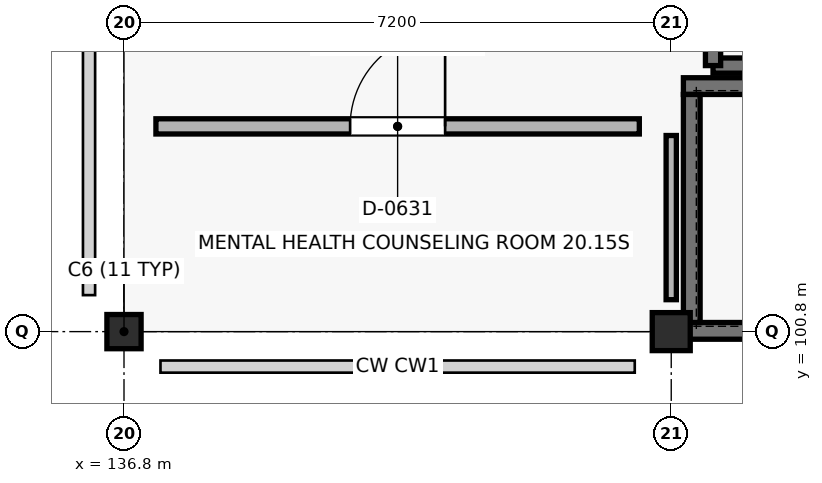
"""IFC4 building model, lengths in metres.
Left out: names, types, materials, properties, quantities, classifications, styles, units other than length and angle.
Written with IfcOpenShell. Run it as: python <this file> out.ifc"""

import sys

from ifc_helpers import new_model, si_unit, direction, frame, frame_2d, origin, origin_2d, place, context, subcontext, project, spatial, rectangle, extrude, element, fill, save


model = new_model("IFC4")
c1 = context("Model", 3, precision=1e-05, world=origin(), true_north=direction((0.0, 1.0)))
c2 = subcontext(c1, "Body", "Model", "MODEL_VIEW")
j1 = project(units=[si_unit("LENGTHUNIT", "METRE"), si_unit("PLANEANGLEUNIT", "RADIAN")], contexts=[c1])
p1 = place(None, origin())
s1 = spatial("IfcSite", under=j1, at=p1, CompositionType="ELEMENT")
p2 = place(p1, origin())
s2 = spatial("IfcBuilding", under=s1, at=p2, CompositionType="ELEMENT")
p3 = place(p2, frame((0.0, 0.0, 17.55)))
s3 = spatial("IfcBuildingStorey", under=s2, at=p3, CompositionType="ELEMENT", Elevation=17.55)
p4 = place(p3, frame((136.8, 100.8, 0.0), z_axis=(0.0, 0.0, 1.0), x_axis=(1.0, 0.0, 0.0)))
e1 = element("IfcColumn", 1, at=p4, inside=s3, PredefinedType="COLUMN", context=c2, shape_type="SweptSolid", body=[
    extrude(rectangle(XDim=0.45, YDim=0.45, at=origin_2d()), origin(), (0.0, 0.0, 1.0), 3.83),
])
p5 = place(p3, frame((144.0, 100.8, 0.0), z_axis=(0.0, 0.0, 1.0), x_axis=(1.0, 0.0, 0.0)))
e2 = element("IfcColumn", 2, at=p5, inside=s3, PredefinedType="COLUMN", context=c2, shape_type="SweptSolid", body=[
    extrude(rectangle(XDim=0.5, YDim=0.5, at=origin_2d()), origin(), (0.0, 0.0, 1.0), 3.83),
])
p6 = place(p3, frame((144.16, 100.81, 0.0), z_axis=(0.0, 0.0, 1.0), x_axis=(1.0, 0.0, 0.0)))
e3 = element("IfcWall", 3, at=p6, inside=s3, PredefinedType="SHEAR", context=c2, shape_type="SweptSolid", body=[
    extrude(rectangle(XDim=6.88, YDim=0.22, at=frame_2d((3.44, 0.0))), origin(), (0.0, 0.0, 1.0), 3.8),
])
p7 = place(p3, frame((144.16, 104.03, 0.0), z_axis=(0.0, 0.0, 1.0), x_axis=(1.0, 0.0, 0.0)))
e4 = element("IfcWall", 4, at=p7, inside=s3, PredefinedType="SHEAR", context=c2, shape_type="SweptSolid", body=[
    extrude(rectangle(XDim=6.88, YDim=0.22, at=frame_2d((3.44, 0.0))), origin(), (0.0, 0.0, 1.0), 3.8),
])
p8 = place(p7, frame((5.25, 0.0, 0.0)))
e5 = element("IfcOpeningElement", 5, at=p8, cuts=e4, PredefinedType="OPENING", context=c2, shape_type="SweptSolid", body=[
    extrude(rectangle(XDim=1.2, YDim=2.15, at=frame_2d((0.6, 1.075))), frame((0.0, 0.12, 0.0), z_axis=(0.0, -1.0, 0.0), x_axis=(1.0, 0.0, 0.0)), (0.0, 0.0, 1.0), 0.24),
])
p9 = place(p3, frame((144.27, 100.92, 0.0), z_axis=(0.0, 0.0, 1.0), x_axis=(0.0, 1.0, 0.0)))
e6 = element("IfcWall", 6, at=p9, inside=s3, PredefinedType="SHEAR", context=c2, shape_type="SweptSolid", body=[
    extrude(rectangle(XDim=3.0, YDim=0.22, at=frame_2d((1.5, 0.0))), origin(), (0.0, 0.0, 1.0), 3.8),
])
p10 = place(p3, frame((144.55, 104.3, 0.0), z_axis=(0.0, 0.0, 1.0), x_axis=(1.0, 0.0, 0.0)))
e7 = element("IfcWall", 7, at=p10, inside=s3, PredefinedType="SHEAR", context=c2, shape_type="SweptSolid", body=[
    extrude(rectangle(XDim=2.1, YDim=0.2, at=frame_2d((1.05, 0.0))), origin(), (0.0, 0.0, 1.0), 4.05),
])
p11 = place(p3, frame((144.55, 104.3, 0.0), z_axis=(0.0, 0.0, 1.0), x_axis=(0.0, 1.0, 0.0)))
e8 = element("IfcWall", 8, at=p11, inside=s3, PredefinedType="SHEAR", context=c2, shape_type="SweptSolid", body=[
    extrude(rectangle(XDim=2.55, YDim=0.2, at=frame_2d((1.275, 0.0))), origin(), (0.0, 0.0, 1.0), 4.05),
])
p12 = place(p3, frame((137.22, 103.5, 0.0), z_axis=(0.0, 0.0, 1.0), x_axis=(1.0, 0.0, 0.0)))
e9 = element("IfcWall", 9, at=p12, inside=s3, PredefinedType="SOLIDWALL", context=c2, shape_type="SweptSolid", body=[
    extrude(rectangle(XDim=6.36, YDim=0.2, at=frame_2d((3.18, 0.0))), origin(), (0.0, 0.0, 1.0), 2.94),
])
p13 = place(p12, frame((2.555, 0.0, 0.0)))
e10 = element("IfcOpeningElement", 10, at=p13, cuts=e9, PredefinedType="OPENING", context=c2, shape_type="SweptSolid", body=[
    extrude(rectangle(XDim=1.25, YDim=2.15, at=frame_2d((0.625, 1.075))), frame((0.0, 0.11, 0.0), z_axis=(0.0, -1.0, 0.0), x_axis=(1.0, 0.0, 0.0)), (0.0, 0.0, 1.0), 0.22),
])
p14 = place(p3, frame((144.0, 101.22, 0.0), z_axis=(0.0, 0.0, 1.0), x_axis=(0.0, 1.0, 0.0)))
e11 = element("IfcWall", 11, at=p14, inside=s3, PredefinedType="PARTITIONING", context=c2, shape_type="SweptSolid", body=[
    extrude(rectangle(XDim=2.16, YDim=0.135, at=frame_2d((1.08, 0.0))), origin(), (0.0, 0.0, 1.0), 2.94),
])
p15 = place(p13, origin())
e12 = element("IfcDoor", 12, at=p15, inside=s3, OperationType="SINGLE_SWING_RIGHT", PredefinedType="DOOR", context=c2, shape_type="SweptSolid", body=[
    extrude(rectangle(XDim=1.25, YDim=2.15, at=frame_2d((0.625, 1.075))), frame((0.0, 0.025, 0.0), z_axis=(0.0, -1.0, 0.0), x_axis=(1.0, 0.0, 0.0)), (0.0, 0.0, 1.0), 0.05),
])
fill(e10, e12)
save(model, sys.argv[1])
